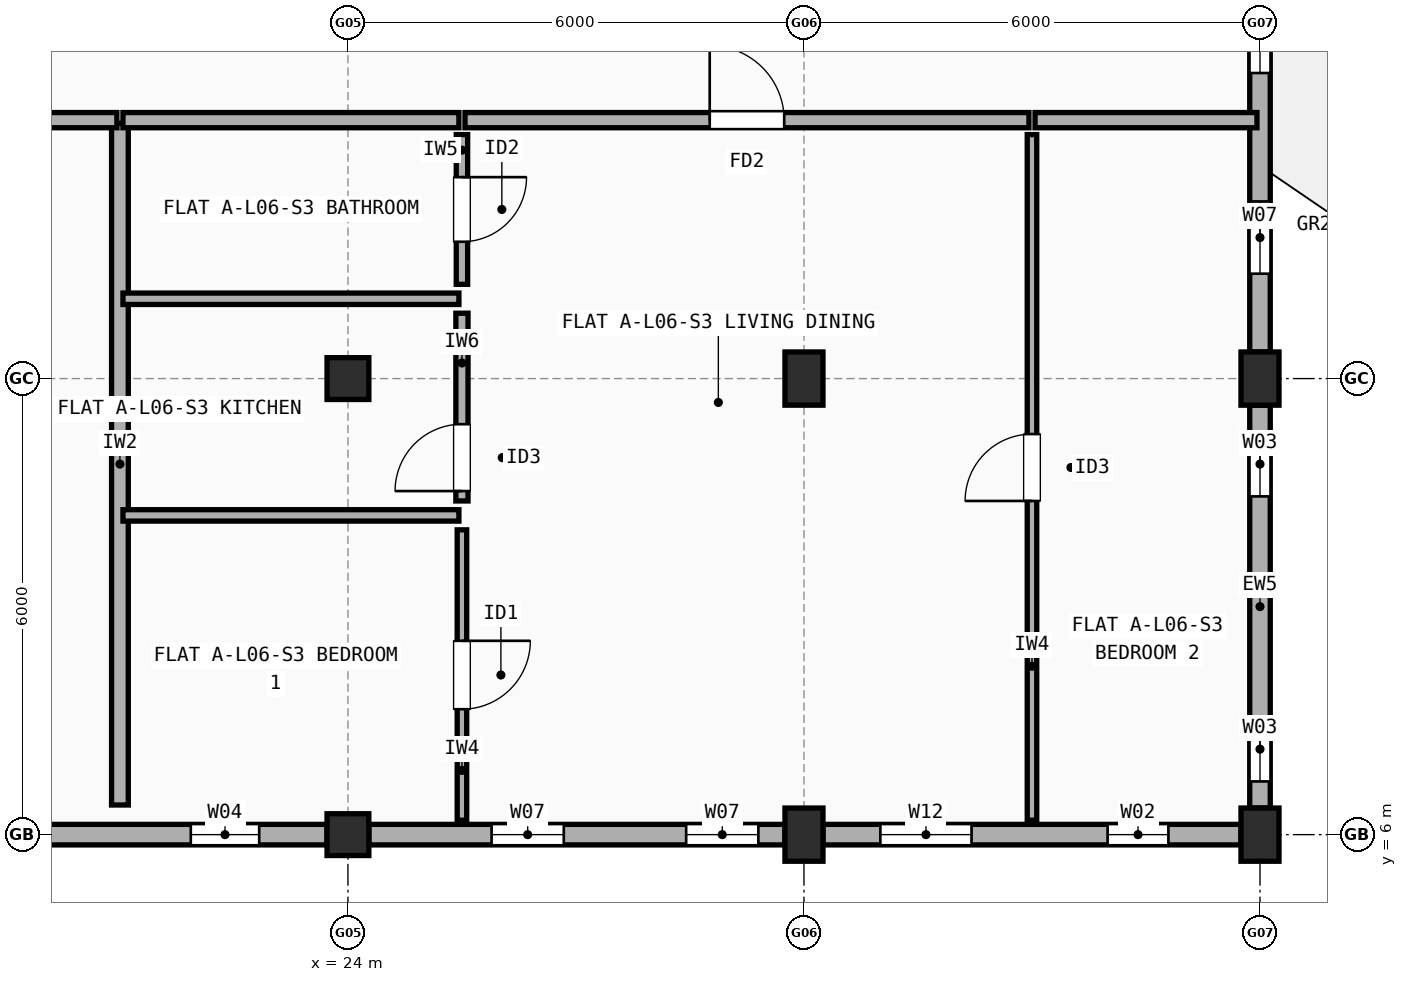
"""IFC4 building model, lengths in metres.
Left out: names, types, materials, properties, quantities, classifications, styles, units other than length and angle.
Written with IfcOpenShell. Run it as: python <this file> out.ifc"""

import sys

from ifc_helpers import new_model, si_unit, direction, frame, frame_2d, origin, origin_2d, place, context, subcontext, project, spatial, rectangle, extrude, element, fill, save


model = new_model("IFC4")
c1 = context("Model", 3, precision=1e-05, world=origin(), true_north=direction((0.0, 1.0)))
c2 = subcontext(c1, "Body", "Model", "MODEL_VIEW")
j1 = project(units=[si_unit("LENGTHUNIT", "METRE"), si_unit("PLANEANGLEUNIT", "RADIAN")], contexts=[c1])
p1 = place(None, origin())
s1 = spatial("IfcSite", under=j1, at=p1, CompositionType="ELEMENT")
p2 = place(p1, origin())
s2 = spatial("IfcBuilding", under=s1, at=p2, CompositionType="ELEMENT")
p3 = place(p2, frame((0.0, 0.0, 20.5)))
s3 = spatial("IfcBuildingStorey", under=s2, at=p3, CompositionType="ELEMENT", Elevation=20.5)
for number, where, z_axis, x_axis in (
    (1, (24.0, 6.0, 0.0), (0.0, 0.0, 1.0), (1.0, 0.0, 0.0)),
    (2, (24.0, 12.0, 0.0), (0.0, 0.0, 1.0), (1.0, 0.0, 0.0)),
):
    element("IfcColumn", number, at=place(p3, frame(where, z_axis=z_axis, x_axis=x_axis)), inside=s3, PredefinedType="COLUMN", context=c2, shape_type="SweptSolid", body=[
        extrude(rectangle(XDim=0.55, YDim=0.55, at=origin_2d()), origin(), (0.0, 0.0, 1.0), 2.97),
    ])
for number, where, z_axis, x_axis in (
    (3, (30.0, 6.0, 0.0), (0.0, 0.0, 1.0), (1.0, 0.0, 0.0)),
    (4, (30.0, 12.0, 0.0), (0.0, 0.0, 1.0), (1.0, 0.0, 0.0)),
    (5, (36.0, 6.0, 0.0), (0.0, 0.0, 1.0), (1.0, 0.0, 0.0)),
    (6, (36.0, 12.0, 0.0), (0.0, 0.0, 1.0), (1.0, 0.0, 0.0)),
):
    element("IfcColumn", number, at=place(p3, frame(where, z_axis=z_axis, x_axis=x_axis)), inside=s3, PredefinedType="COLUMN", context=c2, shape_type="SweptSolid", body=[
        extrude(rectangle(XDim=0.5, YDim=0.7, at=origin_2d()), origin(), (0.0, 0.0, 1.0), 2.97),
    ])
p4 = place(p3, frame((18.275, 6.0, 0.0), z_axis=(0.0, 0.0, 1.0), x_axis=(1.0, 0.0, 0.0)))
e7 = element("IfcWall", 7, at=p4, inside=s3, PredefinedType="STANDARD", context=c2, shape_type="SweptSolid", body=[
    extrude(rectangle(XDim=5.45, YDim=0.27, at=frame_2d((2.725, 0.0))), origin(), (0.0, 0.0, 1.0), 2.452),
])
p5 = place(p4, frame((0.917, 0.0, 0.9)))
e8 = element("IfcOpeningElement", 8, at=p5, cuts=e7, PredefinedType="OPENING", context=c2, shape_type="SweptSolid", body=[
    extrude(rectangle(XDim=0.85, YDim=1.25, at=frame_2d((0.425, 0.625))), frame((0.0, 0.145, 0.0), z_axis=(0.0, -1.0, 0.0), x_axis=(1.0, 0.0, 0.0)), (0.0, 0.0, 1.0), 0.29),
])
p6 = place(p4, frame((3.657, 0.0, 0.9)))
e9 = element("IfcOpeningElement", 9, at=p6, cuts=e7, PredefinedType="OPENING", context=c2, shape_type="SweptSolid", body=[
    extrude(rectangle(XDim=0.9, YDim=1.3, at=frame_2d((0.45, 0.65))), frame((0.0, 0.145, 0.0), z_axis=(0.0, -1.0, 0.0), x_axis=(1.0, 0.0, 0.0)), (0.0, 0.0, 1.0), 0.29),
])
p7 = place(p3, frame((24.275, 6.0, 0.0), z_axis=(0.0, 0.0, 1.0), x_axis=(1.0, 0.0, 0.0)))
e10 = element("IfcWall", 10, at=p7, inside=s3, PredefinedType="STANDARD", context=c2, shape_type="SweptSolid", body=[
    extrude(rectangle(XDim=5.475, YDim=0.27, at=frame_2d((2.738, 0.0))), origin(), (0.0, 0.0, 1.0), 2.452),
])
p8 = place(p7, frame((1.615, 0.0, 0.9)))
e11 = element("IfcOpeningElement", 11, at=p8, cuts=e10, PredefinedType="OPENING", context=c2, shape_type="SweptSolid", body=[
    extrude(rectangle(XDim=0.95, YDim=1.35, at=frame_2d((0.475, 0.675))), frame((0.0, 0.145, 0.0), z_axis=(0.0, -1.0, 0.0), x_axis=(1.0, 0.0, 0.0)), (0.0, 0.0, 1.0), 0.29),
])
p9 = place(p7, frame((4.175, 0.0, 0.9)))
e12 = element("IfcOpeningElement", 12, at=p9, cuts=e10, PredefinedType="OPENING", context=c2, shape_type="SweptSolid", body=[
    extrude(rectangle(XDim=0.95, YDim=1.35, at=frame_2d((0.475, 0.675))), frame((0.0, 0.145, 0.0), z_axis=(0.0, -1.0, 0.0), x_axis=(1.0, 0.0, 0.0)), (0.0, 0.0, 1.0), 0.29),
])
p10 = place(p3, frame((30.25, 6.0, 0.0), z_axis=(0.0, 0.0, 1.0), x_axis=(1.0, 0.0, 0.0)))
e13 = element("IfcWall", 13, at=p10, inside=s3, PredefinedType="STANDARD", context=c2, shape_type="SweptSolid", body=[
    extrude(rectangle(XDim=5.5, YDim=0.27, at=frame_2d((2.75, 0.0))), origin(), (0.0, 0.0, 1.0), 2.452),
])
p11 = place(p10, frame((0.755, 0.0, 0.9)))
e14 = element("IfcOpeningElement", 14, at=p11, cuts=e13, PredefinedType="OPENING", context=c2, shape_type="SweptSolid", body=[
    extrude(rectangle(XDim=1.2, YDim=1.35, at=frame_2d((0.6, 0.675))), frame((0.0, 0.145, 0.0), z_axis=(0.0, -1.0, 0.0), x_axis=(1.0, 0.0, 0.0)), (0.0, 0.0, 1.0), 0.29),
])
p12 = place(p10, frame((3.745, 0.0, 0.9)))
e15 = element("IfcOpeningElement", 15, at=p12, cuts=e13, PredefinedType="OPENING", context=c2, shape_type="SweptSolid", body=[
    extrude(rectangle(XDim=0.8, YDim=1.2, at=frame_2d((0.4, 0.6))), frame((0.0, 0.145, 0.0), z_axis=(0.0, -1.0, 0.0), x_axis=(1.0, 0.0, 0.0)), (0.0, 0.0, 1.0), 0.29),
])
p13 = place(p3, frame((36.0, 6.35, 0.0), z_axis=(0.0, 0.0, 1.0), x_axis=(0.0, 1.0, 0.0)))
e16 = element("IfcWall", 16, at=p13, inside=s3, PredefinedType="STANDARD", context=c2, shape_type="SweptSolid", body=[
    extrude(rectangle(XDim=5.3, YDim=0.27, at=frame_2d((2.65, 0.0))), origin(), (0.0, 0.0, 1.0), 2.452),
])
p14 = place(p13, frame((0.35, 0.0, 0.9)))
e17 = element("IfcOpeningElement", 17, at=p14, cuts=e16, PredefinedType="OPENING", context=c2, shape_type="SweptSolid", body=[
    extrude(rectangle(XDim=0.85, YDim=1.25, at=frame_2d((0.425, 0.625))), frame((0.0, 0.145, 0.0), z_axis=(0.0, -1.0, 0.0), x_axis=(1.0, 0.0, 0.0)), (0.0, 0.0, 1.0), 0.29),
])
p15 = place(p13, frame((4.1, 0.0, 0.9)))
e18 = element("IfcOpeningElement", 18, at=p15, cuts=e16, PredefinedType="OPENING", context=c2, shape_type="SweptSolid", body=[
    extrude(rectangle(XDim=0.85, YDim=1.25, at=frame_2d((0.425, 0.625))), frame((0.0, 0.145, 0.0), z_axis=(0.0, -1.0, 0.0), x_axis=(1.0, 0.0, 0.0)), (0.0, 0.0, 1.0), 0.29),
])
p16 = place(p3, frame((36.0, 12.35, 0.0), z_axis=(0.0, 0.0, 1.0), x_axis=(0.0, 1.0, 0.0)))
e19 = element("IfcWall", 19, at=p16, inside=s3, PredefinedType="STANDARD", context=c2, shape_type="SweptSolid", body=[
    extrude(rectangle(XDim=5.3, YDim=0.27, at=frame_2d((2.65, 0.0))), origin(), (0.0, 0.0, 1.0), 2.452),
])
p17 = place(p16, frame((1.03, 0.0, 0.9)))
e20 = element("IfcOpeningElement", 20, at=p17, cuts=e19, PredefinedType="OPENING", context=c2, shape_type="SweptSolid", body=[
    extrude(rectangle(XDim=0.95, YDim=1.35, at=frame_2d((0.475, 0.675))), frame((0.0, 0.145, 0.0), z_axis=(0.0, -1.0, 0.0), x_axis=(1.0, 0.0, 0.0)), (0.0, 0.0, 1.0), 0.29),
])
p18 = place(p16, frame((3.67, 0.0, 0.9)))
e21 = element("IfcOpeningElement", 21, at=p18, cuts=e19, PredefinedType="OPENING", context=c2, shape_type="SweptSolid", body=[
    extrude(rectangle(XDim=1.05, YDim=1.35, at=frame_2d((0.525, 0.675))), frame((0.0, 0.145, 0.0), z_axis=(0.0, -1.0, 0.0), x_axis=(1.0, 0.0, 0.0)), (0.0, 0.0, 1.0), 0.29),
])
p19 = place(p3, frame((21.0, 6.39, 0.0), z_axis=(0.0, 0.0, 1.0), x_axis=(0.0, 1.0, 0.0)))
e22 = element("IfcWall", 22, at=p19, inside=s3, PredefinedType="SOLIDWALL", context=c2, shape_type="SweptSolid", body=[
    extrude(rectangle(XDim=8.97, YDim=0.22, at=frame_2d((4.485, 0.0))), origin(), (0.0, 0.0, 1.0), 2.548),
])
p20 = place(p3, frame((15.04, 15.4, 0.0), z_axis=(0.0, 0.0, 1.0), x_axis=(1.0, 0.0, 0.0)))
e23 = element("IfcWall", 23, at=p20, inside=s3, PredefinedType="SOLIDWALL", context=c2, shape_type="SweptSolid", body=[
    extrude(rectangle(XDim=5.92, YDim=0.2, at=frame_2d((2.96, 0.0))), origin(), (0.0, 0.0, 1.0), 2.508),
])
p21 = place(p20, frame((2.46, 0.0, 0.0)))
e24 = element("IfcOpeningElement", 24, at=p21, cuts=e23, PredefinedType="OPENING", context=c2, shape_type="SweptSolid", body=[
    extrude(rectangle(XDim=1.0, YDim=2.15, at=frame_2d((0.5, 1.075))), frame((0.0, 0.11, 0.0), z_axis=(0.0, -1.0, 0.0), x_axis=(1.0, 0.0, 0.0)), (0.0, 0.0, 1.0), 0.22),
])
p22 = place(p3, frame((21.04, 15.4, 0.0), z_axis=(0.0, 0.0, 1.0), x_axis=(1.0, 0.0, 0.0)))
e25 = element("IfcWall", 25, at=p22, inside=s3, PredefinedType="SOLIDWALL", context=c2, shape_type="SweptSolid", body=[
    extrude(rectangle(XDim=4.42, YDim=0.2, at=frame_2d((2.21, 0.0))), origin(), (0.0, 0.0, 1.0), 2.508),
])
p23 = place(p3, frame((25.54, 15.4, 0.0), z_axis=(0.0, 0.0, 1.0), x_axis=(1.0, 0.0, 0.0)))
e26 = element("IfcWall", 26, at=p23, inside=s3, PredefinedType="SOLIDWALL", context=c2, shape_type="SweptSolid", body=[
    extrude(rectangle(XDim=7.42, YDim=0.2, at=frame_2d((3.71, 0.0))), origin(), (0.0, 0.0, 1.0), 2.452),
])
p24 = place(p23, frame((3.22, 0.0, 0.0)))
e27 = element("IfcOpeningElement", 27, at=p24, cuts=e26, PredefinedType="OPENING", context=c2, shape_type="SweptSolid", body=[
    extrude(rectangle(XDim=0.98, YDim=2.15, at=frame_2d((0.49, 1.075))), frame((0.0, 0.11, 0.0), z_axis=(0.0, -1.0, 0.0), x_axis=(1.0, 0.0, 0.0)), (0.0, 0.0, 1.0), 0.22),
])
p25 = place(p3, frame((25.5, 6.19, 0.0), z_axis=(0.0, 0.0, 1.0), x_axis=(0.0, 1.0, 0.0)))
e28 = element("IfcWall", 28, at=p25, inside=s3, PredefinedType="PARTITIONING", context=c2, shape_type="SweptSolid", body=[
    extrude(rectangle(XDim=3.82, YDim=0.125, at=frame_2d((1.91, 0.0))), origin(), (0.0, 0.0, 1.0), 2.97),
])
p26 = place(p25, frame((1.46, 0.0, 0.0)))
e29 = element("IfcOpeningElement", 29, at=p26, cuts=e28, PredefinedType="OPENING", context=c2, shape_type="SweptSolid", body=[
    extrude(rectangle(XDim=0.9, YDim=2.1, at=frame_2d((0.45, 1.05))), frame((0.0, 0.073, 0.0), z_axis=(0.0, -1.0, 0.0), x_axis=(1.0, 0.0, 0.0)), (0.0, 0.0, 1.0), 0.145),
])
p27 = place(p3, frame((25.5, 10.39, 0.0), z_axis=(0.0, 0.0, 1.0), x_axis=(0.0, 1.0, 0.0)))
e30 = element("IfcWall", 30, at=p27, inside=s3, PredefinedType="PLUMBINGWALL", context=c2, shape_type="SweptSolid", body=[
    extrude(rectangle(XDim=2.47, YDim=0.16, at=frame_2d((1.235, 0.0))), origin(), (0.0, 0.0, 1.0), 2.508),
])
p28 = place(p27, frame((0.13, 0.0, 0.0)))
e31 = element("IfcOpeningElement", 31, at=p28, cuts=e30, PredefinedType="OPENING", context=c2, shape_type="SweptSolid", body=[
    extrude(rectangle(XDim=0.88, YDim=2.1, at=frame_2d((0.44, 1.05))), frame((0.0, 0.09, 0.0), z_axis=(0.0, -1.0, 0.0), x_axis=(1.0, 0.0, 0.0)), (0.0, 0.0, 1.0), 0.18),
])
p29 = place(p3, frame((25.5, 13.24, 0.0), z_axis=(0.0, 0.0, 1.0), x_axis=(0.0, 1.0, 0.0)))
e32 = element("IfcWall", 32, at=p29, inside=s3, PredefinedType="PARTITIONING", context=c2, shape_type="SweptSolid", body=[
    extrude(rectangle(XDim=1.97, YDim=0.15, at=frame_2d((0.985, 0.0))), origin(), (0.0, 0.0, 1.0), 2.97),
])
p30 = place(p29, frame((0.56, 0.0, 0.0)))
e33 = element("IfcOpeningElement", 33, at=p30, cuts=e32, PredefinedType="OPENING", context=c2, shape_type="SweptSolid", body=[
    extrude(rectangle(XDim=0.85, YDim=2.1, at=frame_2d((0.425, 1.05))), frame((0.0, 0.085, 0.0), z_axis=(0.0, -1.0, 0.0), x_axis=(1.0, 0.0, 0.0)), (0.0, 0.0, 1.0), 0.17),
])
p31 = place(p3, frame((21.04, 10.2, 0.0), z_axis=(0.0, 0.0, 1.0), x_axis=(1.0, 0.0, 0.0)))
e34 = element("IfcWall", 34, at=p31, inside=s3, PredefinedType="PARTITIONING", context=c2, shape_type="SweptSolid", body=[
    extrude(rectangle(XDim=4.42, YDim=0.15, at=frame_2d((2.21, 0.0))), origin(), (0.0, 0.0, 1.0), 2.548),
])
p32 = place(p3, frame((21.04, 13.05, 0.0), z_axis=(0.0, 0.0, 1.0), x_axis=(1.0, 0.0, 0.0)))
e35 = element("IfcWall", 35, at=p32, inside=s3, PredefinedType="PARTITIONING", context=c2, shape_type="SweptSolid", body=[
    extrude(rectangle(XDim=4.42, YDim=0.15, at=frame_2d((2.21, 0.0))), origin(), (0.0, 0.0, 1.0), 2.508),
])
p33 = place(p3, frame((33.04, 15.4, 0.0), z_axis=(0.0, 0.0, 1.0), x_axis=(1.0, 0.0, 0.0)))
e36 = element("IfcWall", 36, at=p33, inside=s3, PredefinedType="SOLIDWALL", context=c2, shape_type="SweptSolid", body=[
    extrude(rectangle(XDim=2.92, YDim=0.2, at=frame_2d((1.46, 0.0))), origin(), (0.0, 0.0, 1.0), 2.452),
])
p34 = place(p3, frame((33.0, 6.19, 0.0), z_axis=(0.0, 0.0, 1.0), x_axis=(0.0, 1.0, 0.0)))
e37 = element("IfcWall", 37, at=p34, inside=s3, PredefinedType="PARTITIONING", context=c2, shape_type="SweptSolid", body=[
    extrude(rectangle(XDim=9.02, YDim=0.125, at=frame_2d((4.51, 0.0))), origin(), (0.0, 0.0, 1.0), 2.408),
])
p35 = place(p34, frame((4.2, 0.0, 0.0)))
e38 = element("IfcOpeningElement", 38, at=p35, cuts=e37, PredefinedType="OPENING", context=c2, shape_type="SweptSolid", body=[
    extrude(rectangle(XDim=0.88, YDim=2.1, at=frame_2d((0.44, 1.05))), frame((0.0, 0.073, 0.0), z_axis=(0.0, -1.0, 0.0), x_axis=(1.0, 0.0, 0.0)), (0.0, 0.0, 1.0), 0.145),
])
p36 = place(p6, origin())
e39 = element("IfcWindow", 39, at=p36, inside=s3, PartitioningType="SINGLE_PANEL", PredefinedType="WINDOW", context=c2, shape_type="SweptSolid", body=[
    extrude(rectangle(XDim=0.9, YDim=1.3, at=frame_2d((0.45, 0.65))), frame((0.0, 0.03, 0.0), z_axis=(0.0, -1.0, 0.0), x_axis=(1.0, 0.0, 0.0)), (0.0, 0.0, 1.0), 0.06),
])
fill(e9, e39)
p37 = place(p8, origin())
e40 = element("IfcWindow", 40, at=p37, inside=s3, PartitioningType="SINGLE_PANEL", PredefinedType="WINDOW", context=c2, shape_type="SweptSolid", body=[
    extrude(rectangle(XDim=0.95, YDim=1.35, at=frame_2d((0.475, 0.675))), frame((0.0, 0.03, 0.0), z_axis=(0.0, -1.0, 0.0), x_axis=(1.0, 0.0, 0.0)), (0.0, 0.0, 1.0), 0.06),
])
fill(e11, e40)
p38 = place(p9, origin())
e41 = element("IfcWindow", 41, at=p38, inside=s3, PartitioningType="SINGLE_PANEL", PredefinedType="WINDOW", context=c2, shape_type="SweptSolid", body=[
    extrude(rectangle(XDim=0.95, YDim=1.35, at=frame_2d((0.475, 0.675))), frame((0.0, 0.03, 0.0), z_axis=(0.0, -1.0, 0.0), x_axis=(1.0, 0.0, 0.0)), (0.0, 0.0, 1.0), 0.06),
])
fill(e12, e41)
p39 = place(p11, origin())
e42 = element("IfcWindow", 42, at=p39, inside=s3, PartitioningType="SINGLE_PANEL", PredefinedType="WINDOW", context=c2, shape_type="SweptSolid", body=[
    extrude(rectangle(XDim=1.2, YDim=1.35, at=frame_2d((0.6, 0.675))), frame((0.0, 0.03, 0.0), z_axis=(0.0, -1.0, 0.0), x_axis=(1.0, 0.0, 0.0)), (0.0, 0.0, 1.0), 0.06),
])
fill(e14, e42)
p40 = place(p12, origin())
e43 = element("IfcWindow", 43, at=p40, inside=s3, PartitioningType="SINGLE_PANEL", PredefinedType="WINDOW", context=c2, shape_type="SweptSolid", body=[
    extrude(rectangle(XDim=0.8, YDim=1.2, at=frame_2d((0.4, 0.6))), frame((0.0, 0.03, 0.0), z_axis=(0.0, -1.0, 0.0), x_axis=(1.0, 0.0, 0.0)), (0.0, 0.0, 1.0), 0.06),
])
fill(e15, e43)
p41 = place(p14, origin())
e44 = element("IfcWindow", 44, at=p41, inside=s3, PartitioningType="SINGLE_PANEL", PredefinedType="WINDOW", context=c2, shape_type="SweptSolid", body=[
    extrude(rectangle(XDim=0.85, YDim=1.25, at=frame_2d((0.425, 0.625))), frame((0.0, 0.03, 0.0), z_axis=(0.0, -1.0, 0.0), x_axis=(1.0, 0.0, 0.0)), (0.0, 0.0, 1.0), 0.06),
])
fill(e17, e44)
p42 = place(p15, origin())
e45 = element("IfcWindow", 45, at=p42, inside=s3, PartitioningType="SINGLE_PANEL", PredefinedType="WINDOW", context=c2, shape_type="SweptSolid", body=[
    extrude(rectangle(XDim=0.85, YDim=1.25, at=frame_2d((0.425, 0.625))), frame((0.0, 0.03, 0.0), z_axis=(0.0, -1.0, 0.0), x_axis=(1.0, 0.0, 0.0)), (0.0, 0.0, 1.0), 0.06),
])
fill(e18, e45)
p43 = place(p17, origin())
e46 = element("IfcWindow", 46, at=p43, inside=s3, PartitioningType="SINGLE_PANEL", PredefinedType="WINDOW", context=c2, shape_type="SweptSolid", body=[
    extrude(rectangle(XDim=0.95, YDim=1.35, at=frame_2d((0.475, 0.675))), frame((0.0, 0.03, 0.0), z_axis=(0.0, -1.0, 0.0), x_axis=(1.0, 0.0, 0.0)), (0.0, 0.0, 1.0), 0.06),
])
fill(e20, e46)
p44 = place(p18, origin())
e47 = element("IfcWindow", 47, at=p44, inside=s3, PartitioningType="SINGLE_PANEL", PredefinedType="WINDOW", context=c2, shape_type="SweptSolid", body=[
    extrude(rectangle(XDim=1.05, YDim=1.35, at=frame_2d((0.525, 0.675))), frame((0.0, 0.03, 0.0), z_axis=(0.0, -1.0, 0.0), x_axis=(1.0, 0.0, 0.0)), (0.0, 0.0, 1.0), 0.06),
])
fill(e21, e47)
p45 = place(p24, origin())
e48 = element("IfcDoor", 48, at=p45, inside=s3, OperationType="SINGLE_SWING_LEFT", PredefinedType="DOOR", context=c2, shape_type="SweptSolid", body=[
    extrude(rectangle(XDim=0.98, YDim=2.15, at=frame_2d((0.49, 1.075))), frame((0.0, 0.025, 0.0), z_axis=(0.0, -1.0, 0.0), x_axis=(1.0, 0.0, 0.0)), (0.0, 0.0, 1.0), 0.05),
])
fill(e27, e48)
p46 = place(p26, origin())
e49 = element("IfcDoor", 49, at=p46, inside=s3, OperationType="SINGLE_SWING_RIGHT", PredefinedType="DOOR", context=c2, shape_type="SweptSolid", body=[
    extrude(rectangle(XDim=0.9, YDim=2.1, at=frame_2d((0.45, 1.05))), frame((0.0, 0.025, 0.0), z_axis=(0.0, -1.0, 0.0), x_axis=(1.0, 0.0, 0.0)), (0.0, 0.0, 1.0), 0.05),
])
fill(e29, e49)
p47 = place(p28, origin())
e50 = element("IfcDoor", 50, at=p47, inside=s3, OperationType="SINGLE_SWING_LEFT", PredefinedType="DOOR", context=c2, shape_type="SweptSolid", body=[
    extrude(rectangle(XDim=0.88, YDim=2.1, at=frame_2d((0.44, 1.05))), frame((0.0, 0.025, 0.0), z_axis=(0.0, -1.0, 0.0), x_axis=(1.0, 0.0, 0.0)), (0.0, 0.0, 1.0), 0.05),
])
fill(e31, e50)
p48 = place(p30, origin())
e51 = element("IfcDoor", 51, at=p48, inside=s3, OperationType="SINGLE_SWING_RIGHT", PredefinedType="DOOR", context=c2, shape_type="SweptSolid", body=[
    extrude(rectangle(XDim=0.85, YDim=2.1, at=frame_2d((0.425, 1.05))), frame((0.0, 0.025, 0.0), z_axis=(0.0, -1.0, 0.0), x_axis=(1.0, 0.0, 0.0)), (0.0, 0.0, 1.0), 0.05),
])
fill(e33, e51)
p49 = place(p35, origin())
e52 = element("IfcDoor", 52, at=p49, inside=s3, OperationType="SINGLE_SWING_LEFT", PredefinedType="DOOR", context=c2, shape_type="SweptSolid", body=[
    extrude(rectangle(XDim=0.88, YDim=2.1, at=frame_2d((0.44, 1.05))), frame((0.0, 0.025, 0.0), z_axis=(0.0, -1.0, 0.0), x_axis=(1.0, 0.0, 0.0)), (0.0, 0.0, 1.0), 0.05),
])
fill(e38, e52)
save(model, sys.argv[1])
